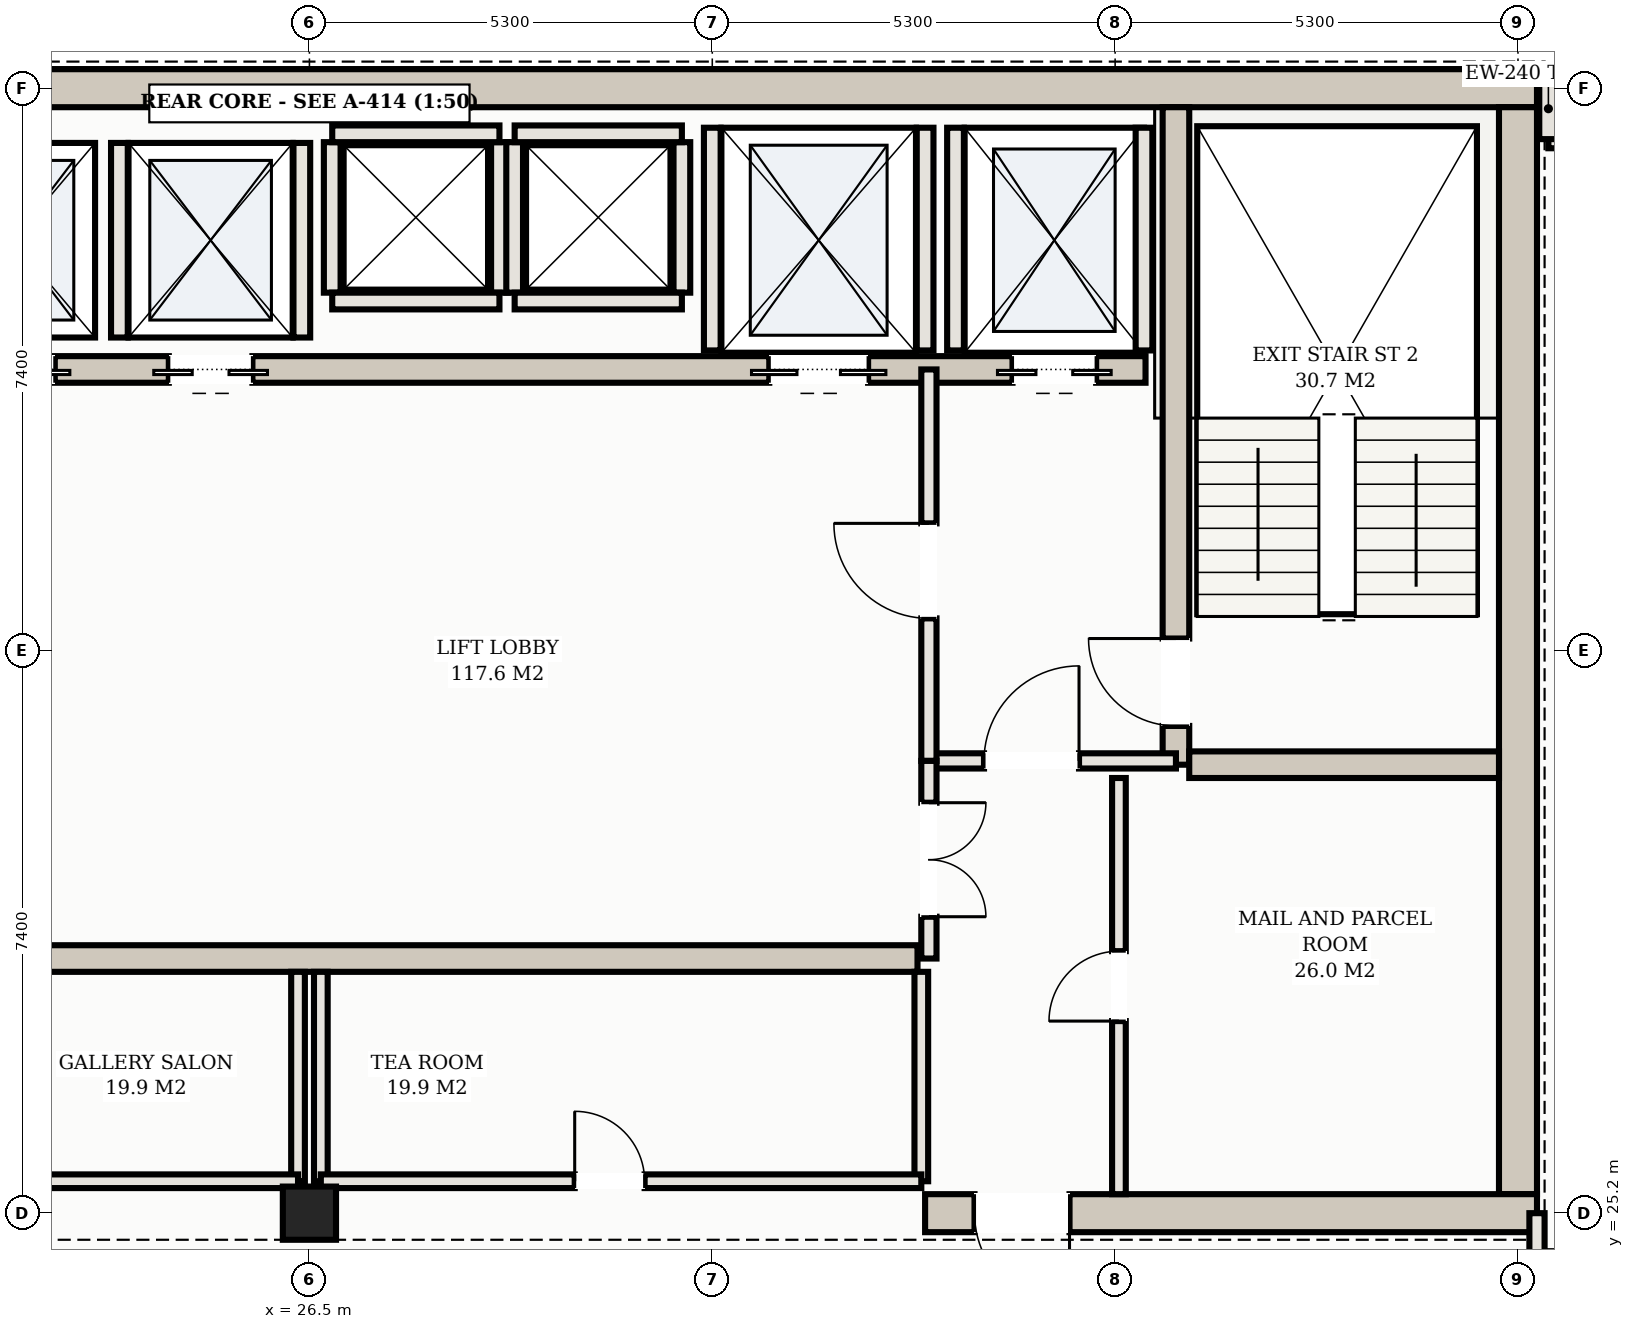
"""IFC4 building model, lengths in metres.
Left out: names, types, materials, properties, quantities, classifications, styles, units other than length and angle.
Written with IfcOpenShell. Run it as: python <this file> out.ifc"""

import sys

from ifc_helpers import new_model, si_unit, direction, frame, frame_2d, origin, origin_2d, place, context, subcontext, project, spatial, rectangle, hollow_rectangle, extrude, element, fill, save


model = new_model("IFC4")
c1 = context("Model", 3, precision=1e-05, world=origin(), true_north=direction((0.0, 1.0)))
c2 = subcontext(c1, "Body", "Model", "MODEL_VIEW")
j1 = project(units=[si_unit("LENGTHUNIT", "METRE"), si_unit("PLANEANGLEUNIT", "RADIAN")], contexts=[c1])
p1 = place(None, origin())
s1 = spatial("IfcSite", under=j1, at=p1, CompositionType="ELEMENT")
p2 = place(p1, origin())
s2 = spatial("IfcBuilding", under=s1, at=p2, CompositionType="ELEMENT")
p3 = place(p2, frame((0.0, 0.0, 242.9)))
s3 = spatial("IfcBuildingStorey", under=s2, at=p3, CompositionType="ELEMENT", Elevation=242.9)
p4 = place(p3, frame((10.35, 40.0, 0.0), z_axis=(0.0, 0.0, 1.0), x_axis=(1.0, 0.0, 0.0)))
e1 = element("IfcWall", 1, at=p4, inside=s3, PredefinedType="SHEAR", context=c2, shape_type="SweptSolid", body=[
    extrude(rectangle(XDim=32.3, YDim=0.5, at=frame_2d((16.15, 0.0))), origin(), (0.0, 0.0, 1.0), 3.11),
])
p5 = place(p3, frame((42.4, 25.45, 0.0), z_axis=(0.0, 0.0, 1.0), x_axis=(0.0, 1.0, 0.0)))
e2 = element("IfcWall", 2, at=p5, inside=s3, PredefinedType="SHEAR", context=c2, shape_type="SweptSolid", body=[
    extrude(rectangle(XDim=14.3, YDim=0.5, at=frame_2d((7.15, 0.0))), origin(), (0.0, 0.0, 1.0), 3.11),
])
p6 = place(p3, frame((34.6, 25.2, 0.0), z_axis=(0.0, 0.0, 1.0), x_axis=(1.0, 0.0, 0.0)))
e3 = element("IfcWall", 3, at=p6, inside=s3, PredefinedType="SHEAR", context=c2, shape_type="SweptSolid", body=[
    extrude(rectangle(XDim=8.05, YDim=0.5, at=frame_2d((4.025, 0.0))), origin(), (0.0, 0.0, 1.0), 3.11),
])
p7 = place(p6, frame((0.65, 0.0, 0.0)))
e4 = element("IfcOpeningElement", 4, at=p7, cuts=e3, PredefinedType="OPENING", context=c2, shape_type="SweptSolid", body=[
    extrude(rectangle(XDim=1.25, YDim=2.2, at=frame_2d((0.625, 1.1))), frame((0.0, 0.26, 0.0), z_axis=(0.0, -1.0, 0.0), x_axis=(1.0, 0.0, 0.0)), (0.0, 0.0, 1.0), 0.52),
])
p8 = place(p3, frame((37.9, 31.1, 0.0), z_axis=(0.0, 0.0, 1.0), x_axis=(0.0, 1.0, 0.0)))
e5 = element("IfcWall", 5, at=p8, inside=s3, PredefinedType="SHEAR", context=c2, shape_type="SweptSolid", body=[
    extrude(rectangle(XDim=8.65, YDim=0.35, at=frame_2d((4.325, 0.0))), origin(), (0.0, 0.0, 1.0), 3.11),
])
p9 = place(p8, frame((0.51, 0.0, 0.0)))
e6 = element("IfcOpeningElement", 6, at=p9, cuts=e5, PredefinedType="OPENING", context=c2, shape_type="SweptSolid", body=[
    extrude(rectangle(XDim=1.15, YDim=2.2, at=frame_2d((0.575, 1.1))), frame((0.0, 0.185, 0.0), z_axis=(0.0, -1.0, 0.0), x_axis=(1.0, 0.0, 0.0)), (0.0, 0.0, 1.0), 0.37),
])
p10 = place(p3, frame((38.075, 31.1, 0.0), z_axis=(0.0, 0.0, 1.0), x_axis=(1.0, 0.0, 0.0)))
e7 = element("IfcWall", 7, at=p10, inside=s3, PredefinedType="SHEAR", context=c2, shape_type="SweptSolid", body=[
    extrude(rectangle(XDim=4.075, YDim=0.35, at=frame_2d((2.038, 0.0))), origin(), (0.0, 0.0, 1.0), 3.11),
])
p11 = place(p3, frame((15.5, 36.3, 0.0), z_axis=(0.0, 0.0, 1.0), x_axis=(1.0, 0.0, 0.0)))
e8 = element("IfcWall", 8, at=p11, inside=s3, PredefinedType="SHEAR", context=c2, shape_type="SweptSolid", body=[
    extrude(rectangle(XDim=22.0, YDim=0.35, at=frame_2d((11.0, 0.0))), origin(), (0.0, 0.0, 1.0), 3.11),
])
p12 = place(p11, frame((0.65, 0.0, 0.0)))
e9 = element("IfcOpeningElement", 9, at=p12, cuts=e8, PredefinedType="OPENING", context=c2, shape_type="SweptSolid", body=[
    extrude(rectangle(XDim=1.1, YDim=2.15, at=frame_2d((0.55, 1.075))), frame((0.0, 0.185, 0.0), z_axis=(0.0, -1.0, 0.0), x_axis=(1.0, 0.0, 0.0)), (0.0, 0.0, 1.0), 0.37),
])
p13 = place(p11, frame((20.25, 0.0, 0.0)))
e10 = element("IfcOpeningElement", 10, at=p13, cuts=e8, PredefinedType="OPENING", context=c2, shape_type="SweptSolid", body=[
    extrude(rectangle(XDim=1.1, YDim=2.15, at=frame_2d((0.55, 1.075))), frame((0.0, 0.185, 0.0), z_axis=(0.0, -1.0, 0.0), x_axis=(1.0, 0.0, 0.0)), (0.0, 0.0, 1.0), 0.37),
])
p14 = place(p11, frame((17.05, 0.0, 0.0)))
e11 = element("IfcOpeningElement", 11, at=p14, cuts=e8, PredefinedType="OPENING", context=c2, shape_type="SweptSolid", body=[
    extrude(rectangle(XDim=1.3, YDim=2.2, at=frame_2d((0.65, 1.1))), frame((0.0, 0.185, 0.0), z_axis=(0.0, -1.0, 0.0), x_axis=(1.0, 0.0, 0.0)), (0.0, 0.0, 1.0), 0.37),
])
p15 = place(p11, frame((3.95, 0.0, 0.0)))
e12 = element("IfcOpeningElement", 12, at=p15, cuts=e8, PredefinedType="OPENING", context=c2, shape_type="SweptSolid", body=[
    extrude(rectangle(XDim=1.1, YDim=2.15, at=frame_2d((0.55, 1.075))), frame((0.0, 0.185, 0.0), z_axis=(0.0, -1.0, 0.0), x_axis=(1.0, 0.0, 0.0)), (0.0, 0.0, 1.0), 0.37),
])
p16 = place(p11, frame((6.55, 0.0, 0.0)))
e13 = element("IfcOpeningElement", 13, at=p16, cuts=e8, PredefinedType="OPENING", context=c2, shape_type="SweptSolid", body=[
    extrude(rectangle(XDim=1.1, YDim=2.15, at=frame_2d((0.55, 1.075))), frame((0.0, 0.185, 0.0), z_axis=(0.0, -1.0, 0.0), x_axis=(1.0, 0.0, 0.0)), (0.0, 0.0, 1.0), 0.37),
])
p17 = place(p11, frame((9.15, 0.0, 0.0)))
e14 = element("IfcOpeningElement", 14, at=p17, cuts=e8, PredefinedType="OPENING", context=c2, shape_type="SweptSolid", body=[
    extrude(rectangle(XDim=1.1, YDim=2.15, at=frame_2d((0.55, 1.075))), frame((0.0, 0.185, 0.0), z_axis=(0.0, -1.0, 0.0), x_axis=(1.0, 0.0, 0.0)), (0.0, 0.0, 1.0), 0.37),
])
p18 = place(p3, frame((18.5, 28.55, 0.0), z_axis=(0.0, 0.0, 1.0), x_axis=(1.0, 0.0, 0.0)))
e15 = element("IfcWall", 15, at=p18, inside=s3, PredefinedType="SHEAR", context=c2, shape_type="SweptSolid", body=[
    extrude(rectangle(XDim=16.0, YDim=0.35, at=frame_2d((8.0, 0.0))), origin(), (0.0, 0.0, 1.0), 3.11),
])
p19 = place(p3, frame((26.5, 25.2, 0.0), z_axis=(0.0, 0.0, 1.0), x_axis=(1.0, 0.0, 0.0)))
e16 = element("IfcColumn", 16, at=p19, inside=s3, PredefinedType="COLUMN", context=c2, shape_type="SweptSolid", body=[
    extrude(hollow_rectangle(XDim=0.7, YDim=0.7, WallThickness=0.025, at=origin_2d()), origin(), (0.0, 0.0, 1.0), 3.3),
])
for number, where, z_axis, x_axis in (
    (17, (35.0, 36.55, 0.0), (0.0, 0.0, 1.0), (0.0, 1.0, 0.0)),
    (18, (37.48, 36.55, 0.0), (0.0, 0.0, 1.0), (0.0, 1.0, 0.0)),
    (19, (31.8, 36.55, 0.0), (0.0, 0.0, 1.0), (0.0, 1.0, 0.0)),
    (20, (34.6, 36.55, 0.0), (0.0, 0.0, 1.0), (0.0, 1.0, 0.0)),
):
    element("IfcWall", number, at=place(p3, frame(where, z_axis=z_axis, x_axis=x_axis)), inside=s3, PredefinedType="SOLIDWALL", context=c2, shape_type="SweptSolid", body=[
        extrude(rectangle(XDim=2.93, YDim=0.22, at=frame_2d((1.465, 0.0))), origin(), (0.0, 0.0, 1.0), 3.11),
    ])
for number, where, z_axis, x_axis in (
    (21, (24.0, 36.72, 0.0), (0.0, 0.0, 1.0), (0.0, 1.0, 0.0)),
    (22, (26.4, 36.72, 0.0), (0.0, 0.0, 1.0), (0.0, 1.0, 0.0)),
):
    element("IfcWall", number, at=place(p3, frame(where, z_axis=z_axis, x_axis=x_axis)), inside=s3, PredefinedType="SOLIDWALL", context=c2, shape_type="SweptSolid", body=[
        extrude(rectangle(XDim=2.56, YDim=0.22, at=frame_2d((1.28, 0.0))), origin(), (0.0, 0.0, 1.0), 3.11),
    ])
for number, where, z_axis, x_axis in (
    (23, (26.8, 37.31, 0.0), (0.0, 0.0, 1.0), (0.0, 1.0, 0.0)),
    (24, (29.0, 37.31, 0.0), (0.0, 0.0, 1.0), (0.0, 1.0, 0.0)),
):
    element("IfcWall", number, at=place(p3, frame(where, z_axis=z_axis, x_axis=x_axis)), inside=s3, PredefinedType="SOLIDWALL", context=c2, shape_type="SweptSolid", body=[
        extrude(rectangle(XDim=1.98, YDim=0.22, at=frame_2d((0.99, 0.0))), origin(), (0.0, 0.0, 1.0), 3.11),
    ])
for number, where, z_axis, x_axis in (
    (25, (26.8, 39.4, 0.0), (0.0, 0.0, 1.0), (1.0, 0.0, 0.0)),
    (26, (26.8, 37.2, 0.0), (0.0, 0.0, 1.0), (1.0, 0.0, 0.0)),
):
    element("IfcWall", number, at=place(p3, frame(where, z_axis=z_axis, x_axis=x_axis)), inside=s3, PredefinedType="SOLIDWALL", context=c2, shape_type="SweptSolid", body=[
        extrude(rectangle(XDim=2.2, YDim=0.22, at=frame_2d((1.1, 0.0))), origin(), (0.0, 0.0, 1.0), 3.11),
    ])
for number, where, z_axis, x_axis in (
    (27, (29.2, 37.31, 0.0), (0.0, 0.0, 1.0), (0.0, 1.0, 0.0)),
    (28, (31.4, 37.31, 0.0), (0.0, 0.0, 1.0), (0.0, 1.0, 0.0)),
):
    element("IfcWall", number, at=place(p3, frame(where, z_axis=z_axis, x_axis=x_axis)), inside=s3, PredefinedType="SOLIDWALL", context=c2, shape_type="SweptSolid", body=[
        extrude(rectangle(XDim=1.98, YDim=0.22, at=frame_2d((0.99, 0.0))), origin(), (0.0, 0.0, 1.0), 3.11),
    ])
for number, where, z_axis, x_axis in (
    (29, (29.2, 39.4, 0.0), (0.0, 0.0, 1.0), (1.0, 0.0, 0.0)),
    (30, (29.2, 37.2, 0.0), (0.0, 0.0, 1.0), (1.0, 0.0, 0.0)),
):
    element("IfcWall", number, at=place(p3, frame(where, z_axis=z_axis, x_axis=x_axis)), inside=s3, PredefinedType="SOLIDWALL", context=c2, shape_type="SweptSolid", body=[
        extrude(rectangle(XDim=2.2, YDim=0.22, at=frame_2d((1.1, 0.0))), origin(), (0.0, 0.0, 1.0), 3.11),
    ])
p20 = place(p3, frame((43.6, 39.33, 0.0), z_axis=(0.0, 0.0, 1.0), x_axis=(-1.0, 0.0, 0.0)))
e31 = element("IfcWall", 31, at=p20, inside=s3, PredefinedType="SOLIDWALL", context=c2, shape_type="SweptSolid", body=[
    extrude(rectangle(XDim=0.8, YDim=0.24, at=frame_2d((0.4, 0.0))), origin(), (0.0, 0.0, 1.0), 3.11),
])
p21 = place(p3, frame((42.8, 39.33, 0.0), z_axis=(0.0, 0.0, 1.0), x_axis=(0.0, 1.0, 0.0)))
e32 = element("IfcWall", 32, at=p21, inside=s3, PredefinedType="SOLIDWALL", context=c2, shape_type="SweptSolid", body=[
    extrude(rectangle(XDim=0.8, YDim=0.24, at=frame_2d((0.4, 0.0))), origin(), (0.0, 0.0, 1.0), 3.11),
])
p22 = place(p3, frame((34.65, 31.15, 0.0), z_axis=(0.0, 0.0, 1.0), x_axis=(1.0, 0.0, 0.0)))
e33 = element("IfcWall", 33, at=p22, inside=s3, PredefinedType="PARTITIONING", context=c2, shape_type="SweptSolid", body=[
    extrude(rectangle(XDim=3.25, YDim=0.2, at=frame_2d((1.625, 0.0))), origin(), (0.0, 0.0, 1.0), 2.45),
])
p23 = place(p22, frame((0.725, 0.0, 0.0)))
e34 = element("IfcOpeningElement", 34, at=p23, cuts=e33, PredefinedType="OPENING", context=c2, shape_type="SweptSolid", body=[
    extrude(rectangle(XDim=1.25, YDim=2.2, at=frame_2d((0.625, 1.1))), frame((0.0, 0.11, 0.0), z_axis=(0.0, -1.0, 0.0), x_axis=(1.0, 0.0, 0.0)), (0.0, 0.0, 1.0), 0.22),
])
p24 = place(p3, frame((34.65, 31.15, 0.0), z_axis=(0.0, 0.0, 1.0), x_axis=(0.0, 1.0, 0.0)))
e35 = element("IfcWall", 35, at=p24, inside=s3, PredefinedType="PARTITIONING", context=c2, shape_type="SweptSolid", body=[
    extrude(rectangle(XDim=5.15, YDim=0.2, at=frame_2d((2.575, 0.0))), origin(), (0.0, 0.0, 1.0), 2.45),
])
p25 = place(p24, frame((1.875, 0.0, 0.0)))
e36 = element("IfcOpeningElement", 36, at=p25, cuts=e35, PredefinedType="OPENING", context=c2, shape_type="SweptSolid", body=[
    extrude(rectangle(XDim=1.25, YDim=2.2, at=frame_2d((0.625, 1.1))), frame((0.0, 0.11, 0.0), z_axis=(0.0, -1.0, 0.0), x_axis=(1.0, 0.0, 0.0)), (0.0, 0.0, 1.0), 0.22),
])
p26 = place(p3, frame((37.15, 25.45, 0.0), z_axis=(0.0, 0.0, 1.0), x_axis=(0.0, 1.0, 0.0)))
e37 = element("IfcWall", 37, at=p26, inside=s3, PredefinedType="PARTITIONING", context=c2, shape_type="SweptSolid", body=[
    extrude(rectangle(XDim=5.475, YDim=0.18, at=frame_2d((2.738, 0.0))), origin(), (0.0, 0.0, 1.0), 2.45),
])
p27 = place(p26, frame((2.277, 0.0, 0.0)))
e38 = element("IfcOpeningElement", 38, at=p27, cuts=e37, PredefinedType="OPENING", context=c2, shape_type="SweptSolid", body=[
    extrude(rectangle(XDim=0.92, YDim=2.15, at=frame_2d((0.46, 1.075))), frame((0.0, 0.1, 0.0), z_axis=(0.0, -1.0, 0.0), x_axis=(1.0, 0.0, 0.0)), (0.0, 0.0, 1.0), 0.2),
])
p28 = place(p3, frame((34.65, 28.55, 0.0), z_axis=(0.0, 0.0, 1.0), x_axis=(0.0, 1.0, 0.0)))
e39 = element("IfcWall", 39, at=p28, inside=s3, PredefinedType="PARTITIONING", context=c2, shape_type="SweptSolid", body=[
    extrude(rectangle(XDim=2.6, YDim=0.2, at=frame_2d((1.3, 0.0))), origin(), (0.0, 0.0, 1.0), 2.45),
])
p29 = place(p28, frame((0.55, 0.0, 0.0)))
e40 = element("IfcOpeningElement", 40, at=p29, cuts=e39, PredefinedType="OPENING", context=c2, shape_type="SweptSolid", body=[
    extrude(rectangle(XDim=1.5, YDim=2.25, at=frame_2d((0.75, 1.125))), frame((0.0, 0.11, 0.0), z_axis=(0.0, -1.0, 0.0), x_axis=(1.0, 0.0, 0.0)), (0.0, 0.0, 1.0), 0.22),
])
p30 = place(p3, frame((26.35, 25.62, 0.0), z_axis=(0.0, 0.0, 1.0), x_axis=(0.0, 1.0, 0.0)))
e41 = element("IfcWall", 41, at=p30, inside=s3, PredefinedType="PARTITIONING", context=c2, shape_type="SweptSolid", body=[
    extrude(rectangle(XDim=2.755, YDim=0.18, at=frame_2d((1.377, 0.0))), origin(), (0.0, 0.0, 1.0), 2.45),
])
p31 = place(p3, frame((18.45, 25.62, 0.0), z_axis=(0.0, 0.0, 1.0), x_axis=(1.0, 0.0, 0.0)))
e42 = element("IfcWall", 42, at=p31, inside=s3, PredefinedType="PARTITIONING", context=c2, shape_type="SweptSolid", body=[
    extrude(rectangle(XDim=7.9, YDim=0.18, at=frame_2d((3.95, 0.0))), origin(), (0.0, 0.0, 1.0), 2.45),
])
p32 = place(p31, frame((3.34, 0.0, 0.0)))
e43 = element("IfcOpeningElement", 43, at=p32, cuts=e42, PredefinedType="OPENING", context=c2, shape_type="SweptSolid", body=[
    extrude(rectangle(XDim=0.92, YDim=2.15, at=frame_2d((0.46, 1.075))), frame((0.0, 0.1, 0.0), z_axis=(0.0, -1.0, 0.0), x_axis=(1.0, 0.0, 0.0)), (0.0, 0.0, 1.0), 0.2),
])
for number, where, z_axis, x_axis in (
    (44, (26.65, 25.62, 0.0), (0.0, 0.0, 1.0), (0.0, 1.0, 0.0)),
    (45, (34.55, 25.62, 0.0), (0.0, 0.0, 1.0), (0.0, 1.0, 0.0)),
):
    element("IfcWall", number, at=place(p3, frame(where, z_axis=z_axis, x_axis=x_axis)), inside=s3, PredefinedType="PARTITIONING", context=c2, shape_type="SweptSolid", body=[
        extrude(rectangle(XDim=2.755, YDim=0.18, at=frame_2d((1.377, 0.0))), origin(), (0.0, 0.0, 1.0), 2.45),
    ])
p33 = place(p3, frame((26.65, 25.62, 0.0), z_axis=(0.0, 0.0, 1.0), x_axis=(1.0, 0.0, 0.0)))
e46 = element("IfcWall", 46, at=p33, inside=s3, PredefinedType="PARTITIONING", context=c2, shape_type="SweptSolid", body=[
    extrude(rectangle(XDim=7.9, YDim=0.18, at=frame_2d((3.95, 0.0))), origin(), (0.0, 0.0, 1.0), 2.45),
])
p34 = place(p33, frame((3.34, 0.0, 0.0)))
e47 = element("IfcOpeningElement", 47, at=p34, cuts=e46, PredefinedType="OPENING", context=c2, shape_type="SweptSolid", body=[
    extrude(rectangle(XDim=0.92, YDim=2.15, at=frame_2d((0.46, 1.075))), frame((0.0, 0.1, 0.0), z_axis=(0.0, -1.0, 0.0), x_axis=(1.0, 0.0, 0.0)), (0.0, 0.0, 1.0), 0.2),
])
p35 = place(p3, frame((42.65, 24.6, 0.0), z_axis=(0.0, 0.0, 1.0), x_axis=(0.0, 1.0, 0.0)))
e48 = element("IfcWall", 48, at=p35, inside=s3, PredefinedType="PARTITIONING", context=c2, shape_type="SweptSolid", body=[
    extrude(rectangle(XDim=0.6, YDim=0.2, at=frame_2d((0.3, 0.0))), origin(), (0.0, 0.0, 1.0), 2.45),
])
p36 = place(p13, frame((1.1, 0.0, 0.0), z_axis=(0.0, 0.0, 1.0), x_axis=(-1.0, 0.0, 0.0)))
e49 = element("IfcDoor", 49, at=p36, inside=s3, OperationType="DOUBLE_DOOR_SLIDING", PredefinedType="DOOR", context=c2, shape_type="SweptSolid", body=[
    extrude(rectangle(XDim=1.1, YDim=2.15, at=frame_2d((0.55, 1.075))), frame((0.0, 0.025, 0.0), z_axis=(0.0, -1.0, 0.0), x_axis=(1.0, 0.0, 0.0)), (0.0, 0.0, 1.0), 0.05),
])
fill(e10, e49)
p37 = place(p14, frame((1.3, 0.0, 0.0), z_axis=(0.0, 0.0, 1.0), x_axis=(-1.0, 0.0, 0.0)))
e50 = element("IfcDoor", 50, at=p37, inside=s3, OperationType="DOUBLE_DOOR_SLIDING", PredefinedType="DOOR", context=c2, shape_type="SweptSolid", body=[
    extrude(rectangle(XDim=1.3, YDim=2.2, at=frame_2d((0.65, 1.1))), frame((0.0, 0.025, 0.0), z_axis=(0.0, -1.0, 0.0), x_axis=(1.0, 0.0, 0.0)), (0.0, 0.0, 1.0), 0.05),
])
fill(e11, e50)
p38 = place(p16, frame((1.1, 0.0, 0.0), z_axis=(0.0, 0.0, 1.0), x_axis=(-1.0, 0.0, 0.0)))
e51 = element("IfcDoor", 51, at=p38, inside=s3, OperationType="DOUBLE_DOOR_SLIDING", PredefinedType="DOOR", context=c2, shape_type="SweptSolid", body=[
    extrude(rectangle(XDim=1.1, YDim=2.15, at=frame_2d((0.55, 1.075))), frame((0.0, 0.025, 0.0), z_axis=(0.0, -1.0, 0.0), x_axis=(1.0, 0.0, 0.0)), (0.0, 0.0, 1.0), 0.05),
])
fill(e13, e51)
p39 = place(p17, frame((1.1, 0.0, 0.0), z_axis=(0.0, 0.0, 1.0), x_axis=(-1.0, 0.0, 0.0)))
e52 = element("IfcDoor", 52, at=p39, inside=s3, OperationType="DOUBLE_DOOR_SLIDING", PredefinedType="DOOR", context=c2, shape_type="SweptSolid", body=[
    extrude(rectangle(XDim=1.1, YDim=2.15, at=frame_2d((0.55, 1.075))), frame((0.0, 0.025, 0.0), z_axis=(0.0, -1.0, 0.0), x_axis=(1.0, 0.0, 0.0)), (0.0, 0.0, 1.0), 0.05),
])
fill(e14, e52)
p40 = place(p7, frame((1.25, 0.0, 0.0), z_axis=(0.0, 0.0, 1.0), x_axis=(-1.0, 0.0, 0.0)))
e53 = element("IfcDoor", 53, at=p40, inside=s3, OperationType="SINGLE_SWING_LEFT", PredefinedType="DOOR", context=c2, shape_type="SweptSolid", body=[
    extrude(rectangle(XDim=1.25, YDim=2.2, at=frame_2d((0.625, 1.1))), frame((0.0, 0.025, 0.0), z_axis=(0.0, -1.0, 0.0), x_axis=(1.0, 0.0, 0.0)), (0.0, 0.0, 1.0), 0.05),
])
fill(e4, e53)
p41 = place(p23, origin())
e54 = element("IfcDoor", 54, at=p41, inside=s3, OperationType="SINGLE_SWING_RIGHT", PredefinedType="DOOR", context=c2, shape_type="SweptSolid", body=[
    extrude(rectangle(XDim=1.25, YDim=2.2, at=frame_2d((0.625, 1.1))), frame((0.0, 0.025, 0.0), z_axis=(0.0, -1.0, 0.0), x_axis=(1.0, 0.0, 0.0)), (0.0, 0.0, 1.0), 0.05),
])
fill(e34, e54)
p42 = place(p25, origin())
e55 = element("IfcDoor", 55, at=p42, inside=s3, OperationType="SINGLE_SWING_RIGHT", PredefinedType="DOOR", context=c2, shape_type="SweptSolid", body=[
    extrude(rectangle(XDim=1.25, YDim=2.2, at=frame_2d((0.625, 1.1))), frame((0.0, 0.025, 0.0), z_axis=(0.0, -1.0, 0.0), x_axis=(1.0, 0.0, 0.0)), (0.0, 0.0, 1.0), 0.05),
])
fill(e36, e55)
p43 = place(p9, origin())
e56 = element("IfcDoor", 56, at=p43, inside=s3, OperationType="SINGLE_SWING_RIGHT", PredefinedType="DOOR", context=c2, shape_type="SweptSolid", body=[
    extrude(rectangle(XDim=1.15, YDim=2.2, at=frame_2d((0.575, 1.1))), frame((0.0, 0.025, 0.0), z_axis=(0.0, -1.0, 0.0), x_axis=(1.0, 0.0, 0.0)), (0.0, 0.0, 1.0), 0.05),
])
fill(e6, e56)
p44 = place(p27, origin())
e57 = element("IfcDoor", 57, at=p44, inside=s3, OperationType="SINGLE_SWING_LEFT", PredefinedType="DOOR", context=c2, shape_type="SweptSolid", body=[
    extrude(rectangle(XDim=0.92, YDim=2.15, at=frame_2d((0.46, 1.075))), frame((0.0, 0.025, 0.0), z_axis=(0.0, -1.0, 0.0), x_axis=(1.0, 0.0, 0.0)), (0.0, 0.0, 1.0), 0.05),
])
fill(e38, e57)
p45 = place(p29, frame((1.5, 0.0, 0.0), z_axis=(0.0, 0.0, 1.0), x_axis=(-1.0, 0.0, 0.0)))
e58 = element("IfcDoor", 58, at=p45, inside=s3, OperationType="DOUBLE_DOOR_SINGLE_SWING", PredefinedType="DOOR", context=c2, shape_type="SweptSolid", body=[
    extrude(rectangle(XDim=1.5, YDim=2.25, at=frame_2d((0.75, 1.125))), frame((0.0, 0.025, 0.0), z_axis=(0.0, -1.0, 0.0), x_axis=(1.0, 0.0, 0.0)), (0.0, 0.0, 1.0), 0.05),
])
fill(e40, e58)
p46 = place(p34, origin())
e59 = element("IfcDoor", 59, at=p46, inside=s3, OperationType="SINGLE_SWING_LEFT", PredefinedType="DOOR", context=c2, shape_type="SweptSolid", body=[
    extrude(rectangle(XDim=0.92, YDim=2.15, at=frame_2d((0.46, 1.075))), frame((0.0, 0.025, 0.0), z_axis=(0.0, -1.0, 0.0), x_axis=(1.0, 0.0, 0.0)), (0.0, 0.0, 1.0), 0.05),
])
fill(e47, e59)
save(model, sys.argv[1])
